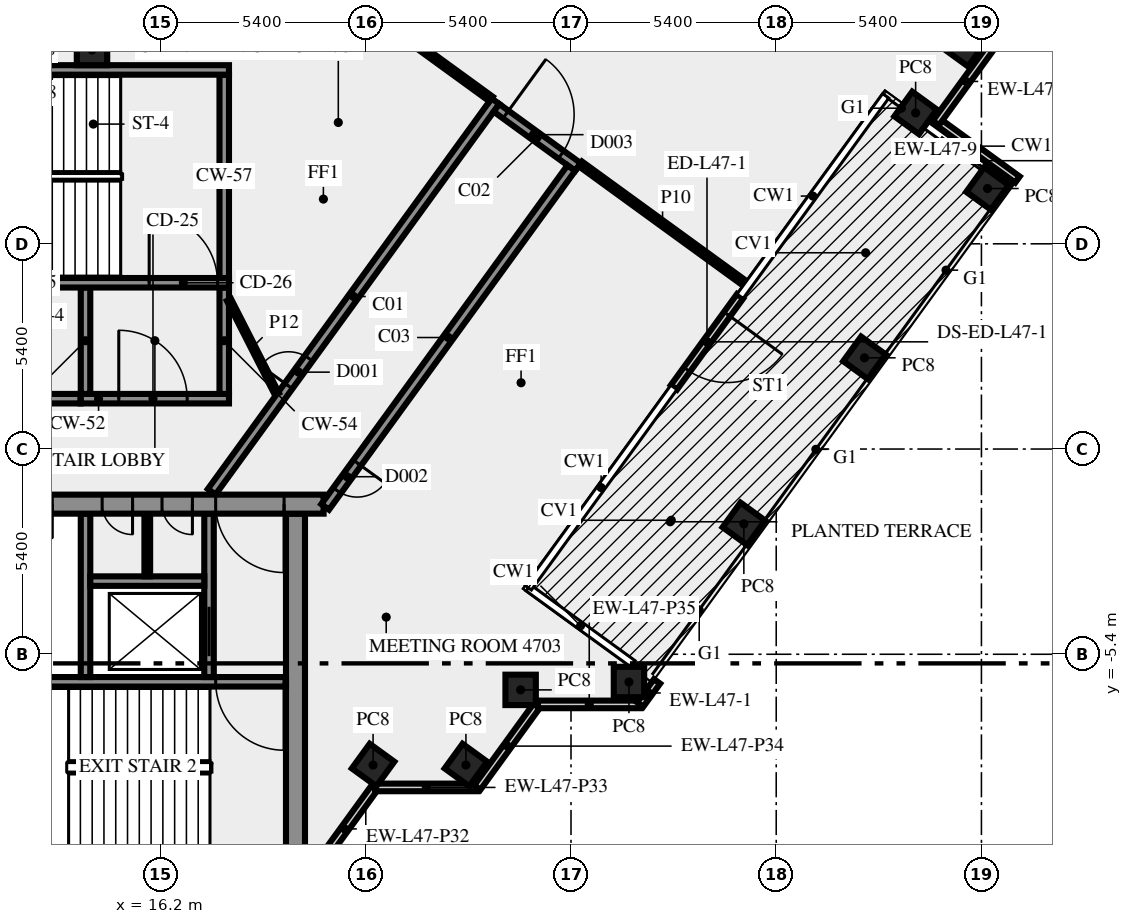
"""IFC4 building model, lengths in metres.
Left out: names, types, materials, properties, quantities, classifications, styles, units other than length and angle.
Written with IfcOpenShell. Run it as: python <this file> out.ifc"""

import sys

from ifc_helpers import new_model, si_unit, direction, frame, frame_2d, origin, origin_2d, place, context, subcontext, project, spatial, rectangle, extrude, element, fill, save


model = new_model("IFC4")
c1 = context("Model", 3, precision=1e-05, world=origin(), true_north=direction((0.0, 1.0)))
c2 = subcontext(c1, "Body", "Model", "MODEL_VIEW")
j1 = project(units=[si_unit("LENGTHUNIT", "METRE"), si_unit("PLANEANGLEUNIT", "RADIAN")], contexts=[c1])
p1 = place(None, origin())
s1 = spatial("IfcSite", under=j1, at=p1, CompositionType="ELEMENT")
p2 = place(p1, origin())
s2 = spatial("IfcBuilding", under=s1, at=p2, CompositionType="ELEMENT")
p3 = place(p2, frame((0.0, 0.0, 202.0)))
s3 = spatial("IfcBuildingStorey", under=s2, at=p3, CompositionType="ELEMENT", Elevation=202.0)
for number, where, z_axis, x_axis in (
    (1, (21.792, -8.315, 0.0), (0.0, 0.0, 1.0), (0.588, 0.809, 0.0)),
    (2, (24.235, -8.315, 0.0), (0.0, 0.0, 1.0), (0.588, 0.809, 0.0)),
    (3, (25.674, -6.337, 0.0), (0.0, 0.0, 1.0), (1.0, 0.0, 0.0)),
    (4, (28.525, -6.13, 0.0), (0.0, 0.0, 1.0), (1.0, 0.0, 0.0)),
    (5, (31.548, -1.969, 0.0), (0.0, 0.0, 1.0), (0.588, 0.809, 0.0)),
    (6, (34.722, 2.4, 0.0), (0.0, 0.0, 1.0), (0.588, 0.809, 0.0)),
    (7, (37.96, 6.855, 0.0), (0.0, 0.0, 1.0), (0.588, 0.809, 0.0)),
    (8, (36.068, 8.844, 0.0), (0.0, 0.0, 1.0), (0.588, 0.809, 0.0)),
    (9, (37.36, 10.625, 0.0), (0.0, 0.0, 1.0), (0.588, 0.809, 0.0)),
    (10, (14.395, 10.5, 0.0), (0.0, 0.0, 1.0), (-1.0, 0.0, 0.0)),
):
    element("IfcColumn", number, at=place(p3, frame(where, z_axis=z_axis, x_axis=x_axis)), inside=s3, PredefinedType="COLUMN", context=c2, shape_type="SweptSolid", body=[
        extrude(rectangle(XDim=0.8, YDim=0.8, at=origin_2d()), origin(), (0.0, 0.0, 1.0), 3.65),
    ])
p4 = place(p3, frame((20.253, -11.083, 0.0), z_axis=(0.0, 0.0, 1.0), x_axis=(0.587766567315, 0.809030569476, 0.0)))
e11 = element("IfcWall", 11, at=p4, inside=s3, PredefinedType="SOLIDWALL", context=c2, shape_type="SweptSolid", body=[
    extrude(rectangle(XDim=2.688, YDim=0.2, at=frame_2d((1.344, 0.0))), origin(), (0.0, 0.0, 1.0), 3.65),
])
p5 = place(p3, frame((21.843, -8.904, 0.0), z_axis=(0.0, 0.0, 1.0), x_axis=(1.0, 0.0, 0.0)))
e12 = element("IfcWall", 12, at=p5, inside=s3, PredefinedType="SOLIDWALL", context=c2, shape_type="SweptSolid", body=[
    extrude(rectangle(XDim=2.7, YDim=0.2, at=frame_2d((1.35, 0.0))), origin(), (0.0, 0.0, 1.0), 3.65),
])
p6 = place(p3, frame((24.533, -8.909, 0.0), z_axis=(0.0, 0.0, 1.0), x_axis=(0.587720002413, 0.809064397168, 0.0)))
e13 = element("IfcWall", 13, at=p6, inside=s3, PredefinedType="SOLIDWALL", context=c2, shape_type="SweptSolid", body=[
    extrude(rectangle(XDim=2.7, YDim=0.2, at=frame_2d((1.35, 0.0))), origin(), (0.0, 0.0, 1.0), 3.65),
])
p7 = place(p3, frame((26.13, -6.719, 0.0), z_axis=(0.0, 0.0, 1.0), x_axis=(1.0, 0.0, 0.0)))
e14 = element("IfcWall", 14, at=p7, inside=s3, PredefinedType="SOLIDWALL", context=c2, shape_type="SweptSolid", body=[
    extrude(rectangle(XDim=2.7, YDim=0.2, at=frame_2d((1.35, 0.0))), origin(), (0.0, 0.0, 1.0), 3.65),
])
p8 = place(p3, frame((28.82, -6.724, 0.0), z_axis=(0.0, 0.0, 1.0), x_axis=(0.587941177097, 0.808903685412, 0.0)))
e15 = element("IfcWall", 15, at=p8, inside=s3, PredefinedType="SOLIDWALL", context=c2, shape_type="SweptSolid", body=[
    extrude(rectangle(XDim=0.756, YDim=0.2, at=frame_2d((0.378, 0.0))), origin(), (0.0, 0.0, 1.0), 3.65),
])
p9 = place(p3, frame((31.449, 4.019, 0.0), z_axis=(0.0, 0.0, 1.0), x_axis=(-0.58782869016, -0.808985433135, 0.0)))
e16 = element("IfcWall", 16, at=p9, inside=s3, PredefinedType="SOLIDWALL", context=c2, shape_type="SweptSolid", body=[
    extrude(rectangle(XDim=2.963, YDim=0.2, at=frame_2d((1.481, 0.0))), origin(), (0.0, 0.0, 1.0), 3.65),
])
p10 = place(p9, frame((0.582, 0.0, 0.0)))
e17 = element("IfcOpeningElement", 17, at=p10, cuts=e16, PredefinedType="OPENING", context=c2, shape_type="SweptSolid", body=[
    extrude(rectangle(XDim=1.8, YDim=2.4, at=frame_2d((0.9, 1.2))), frame((0.0, 0.11, 0.0), z_axis=(0.0, -1.0, 0.0), x_axis=(1.0, 0.0, 0.0)), (0.0, 0.0, 1.0), 0.22),
])
p11 = place(p3, frame((38.748, 7.09, 0.0), z_axis=(0.0, 0.0, 1.0), x_axis=(-0.80901210161, 0.587791986546, 0.0)))
e18 = element("IfcWall", 18, at=p11, inside=s3, PredefinedType="SOLIDWALL", context=c2, shape_type="SweptSolid", body=[
    extrude(rectangle(XDim=2.6, YDim=0.2, at=frame_2d((1.3, 0.0))), origin(), (0.0, 0.0, 1.0), 3.65),
])
p12 = place(p3, frame((36.602, 8.58, 0.0), z_axis=(0.0, 0.0, 1.0), x_axis=(0.587822180636, 0.808990163075, 0.0)))
e19 = element("IfcWall", 19, at=p12, inside=s3, PredefinedType="SOLIDWALL", context=c2, shape_type="SweptSolid", body=[
    extrude(rectangle(XDim=2.7, YDim=0.2, at=frame_2d((1.35, 0.0))), origin(), (0.0, 0.0, 1.0), 3.65),
])
p13 = place(p3, frame((19.75, -10.5, 0.0), z_axis=(0.0, 0.0, 1.0), x_axis=(0.0, 1.0, 0.0)))
e20 = element("IfcWall", 20, at=p13, inside=s3, PredefinedType="SHEAR", context=c2, shape_type="SweptSolid", body=[
    extrude(rectangle(XDim=8.8, YDim=0.5, at=frame_2d((4.4, 0.0))), origin(), (0.0, 0.0, 1.0), 3.65),
])
p14 = place(p3, frame((19.5, -6.125, 0.0), z_axis=(0.0, 0.0, 1.0), x_axis=(-1.0, 0.0, 0.0)))
e21 = element("IfcWall", 21, at=p14, inside=s3, PredefinedType="SHEAR", context=c2, shape_type="SweptSolid", body=[
    extrude(rectangle(XDim=8.05, YDim=0.25, at=frame_2d((4.025, 0.0))), origin(), (0.0, 0.0, 1.0), 3.65),
])
p15 = place(p14, frame((0.05, 0.0, 0.0)))
e22 = element("IfcOpeningElement", 22, at=p15, cuts=e21, PredefinedType="OPENING", context=c2, shape_type="SweptSolid", body=[
    extrude(rectangle(XDim=1.8, YDim=2.1, at=frame_2d((0.9, 1.05))), frame((0.0, 0.135, 0.0), z_axis=(0.0, -1.0, 0.0), x_axis=(1.0, 0.0, 0.0)), (0.0, 0.0, 1.0), 0.27),
])
p16 = place(p3, frame((14.225, -6.0, 0.0), z_axis=(0.0, 0.0, 1.0), x_axis=(0.0, 1.0, 0.0)))
e23 = element("IfcWall", 23, at=p16, inside=s3, PredefinedType="SHEAR", context=c2, shape_type="SweptSolid", body=[
    extrude(rectangle(XDim=4.3, YDim=0.25, at=frame_2d((2.15, 0.0))), origin(), (0.0, 0.0, 1.0), 3.65),
])
p17 = place(p3, frame((17.475, -6.0, 0.0), z_axis=(0.0, 0.0, 1.0), x_axis=(0.0, 1.0, 0.0)))
e24 = element("IfcWall", 24, at=p17, inside=s3, PredefinedType="SHEAR", context=c2, shape_type="SweptSolid", body=[
    extrude(rectangle(XDim=4.3, YDim=0.25, at=frame_2d((2.15, 0.0))), origin(), (0.0, 0.0, 1.0), 3.65),
])
p18 = place(p17, frame((0.55, 0.0, 0.0)))
e25 = element("IfcOpeningElement", 25, at=p18, cuts=e24, PredefinedType="OPENING", context=c2, shape_type="SweptSolid", body=[
    extrude(rectangle(XDim=1.3, YDim=2.1, at=frame_2d((0.65, 1.05))), frame((0.0, 0.135, 0.0), z_axis=(0.0, -1.0, 0.0), x_axis=(1.0, 0.0, 0.0)), (0.0, 0.0, 1.0), 0.27),
])
p19 = place(p3, frame((14.35, -3.475, 0.0), z_axis=(0.0, 0.0, 1.0), x_axis=(1.0, 0.0, 0.0)))
e26 = element("IfcWall", 26, at=p19, inside=s3, PredefinedType="SHEAR", context=c2, shape_type="SweptSolid", body=[
    extrude(rectangle(XDim=3.0, YDim=0.25, at=frame_2d((1.5, 0.0))), origin(), (0.0, 0.0, 1.0), 3.65),
])
p20 = place(p3, frame((15.85, -3.35, 0.0), z_axis=(0.0, 0.0, 1.0), x_axis=(0.0, 1.0, 0.0)))
e27 = element("IfcWall", 27, at=p20, inside=s3, PredefinedType="PARTITIONING", context=c2, shape_type="SweptSolid", body=[
    extrude(rectangle(XDim=1.65, YDim=0.15, at=frame_2d((0.825, 0.0))), origin(), (0.0, 0.0, 1.0), 3.65),
])
p21 = place(p3, frame((20.49, -1.45, 0.0), z_axis=(0.0, 0.0, 1.0), x_axis=(-1.0, 0.0, 0.0)))
e28 = element("IfcWall", 28, at=p21, inside=s3, PredefinedType="SHEAR", context=c2, shape_type="SweptSolid", body=[
    extrude(rectangle(XDim=40.98, YDim=0.5, at=frame_2d((20.49, 0.0))), origin(), (0.0, 0.0, 1.0), 3.65),
])
p22 = place(p21, frame((38.14, 0.0, 0.0)))
e29 = element("IfcOpeningElement", 29, at=p22, cuts=e28, PredefinedType="OPENING", context=c2, shape_type="SweptSolid", body=[
    extrude(rectangle(XDim=1.8, YDim=2.1, at=frame_2d((0.9, 1.05))), frame((0.0, 0.26, 0.0), z_axis=(0.0, -1.0, 0.0), x_axis=(1.0, 0.0, 0.0)), (0.0, 0.0, 1.0), 0.52),
])
p23 = place(p21, frame((35.89, 0.0, 0.0)))
e30 = element("IfcOpeningElement", 30, at=p23, cuts=e28, PredefinedType="OPENING", context=c2, shape_type="SweptSolid", body=[
    extrude(rectangle(XDim=0.9, YDim=2.1, at=frame_2d((0.45, 1.05))), frame((0.0, 0.26, 0.0), z_axis=(0.0, -1.0, 0.0), x_axis=(1.0, 0.0, 0.0)), (0.0, 0.0, 1.0), 0.52),
])
p24 = place(p21, frame((32.94, 0.0, 0.0)))
e31 = element("IfcOpeningElement", 31, at=p24, cuts=e28, PredefinedType="OPENING", context=c2, shape_type="SweptSolid", body=[
    extrude(rectangle(XDim=0.9, YDim=2.1, at=frame_2d((0.45, 1.05))), frame((0.0, 0.26, 0.0), z_axis=(0.0, -1.0, 0.0), x_axis=(1.0, 0.0, 0.0)), (0.0, 0.0, 1.0), 0.52),
])
p25 = place(p21, frame((30.302, 0.0, 0.0)))
e32 = element("IfcOpeningElement", 32, at=p25, cuts=e28, PredefinedType="OPENING", context=c2, shape_type="SweptSolid", body=[
    extrude(rectangle(XDim=0.9, YDim=2.1, at=frame_2d((0.45, 1.05))), frame((0.0, 0.26, 0.0), z_axis=(0.0, -1.0, 0.0), x_axis=(1.0, 0.0, 0.0)), (0.0, 0.0, 1.0), 0.52),
])
p26 = place(p21, frame((26.577, 0.0, 0.0)))
e33 = element("IfcOpeningElement", 33, at=p26, cuts=e28, PredefinedType="OPENING", context=c2, shape_type="SweptSolid", body=[
    extrude(rectangle(XDim=0.9, YDim=2.1, at=frame_2d((0.45, 1.05))), frame((0.0, 0.26, 0.0), z_axis=(0.0, -1.0, 0.0), x_axis=(1.0, 0.0, 0.0)), (0.0, 0.0, 1.0), 0.52),
])
p27 = place(p21, frame((19.59, 0.0, 0.0)))
e34 = element("IfcOpeningElement", 34, at=p27, cuts=e28, PredefinedType="OPENING", context=c2, shape_type="SweptSolid", body=[
    extrude(rectangle(XDim=2.0, YDim=2.1, at=frame_2d((1.0, 1.05))), frame((0.0, 0.26, 0.0), z_axis=(0.0, -1.0, 0.0), x_axis=(1.0, 0.0, 0.0)), (0.0, 0.0, 1.0), 0.52),
])
p28 = place(p21, frame((7.14, 0.0, 0.0)))
e35 = element("IfcOpeningElement", 35, at=p28, cuts=e28, PredefinedType="OPENING", context=c2, shape_type="SweptSolid", body=[
    extrude(rectangle(XDim=0.9, YDim=2.1, at=frame_2d((0.45, 1.05))), frame((0.0, 0.26, 0.0), z_axis=(0.0, -1.0, 0.0), x_axis=(1.0, 0.0, 0.0)), (0.0, 0.0, 1.0), 0.52),
])
p29 = place(p21, frame((5.028, 0.0, 0.0)))
e36 = element("IfcOpeningElement", 36, at=p29, cuts=e28, PredefinedType="OPENING", context=c2, shape_type="SweptSolid", body=[
    extrude(rectangle(XDim=0.8, YDim=2.1, at=frame_2d((0.4, 1.05))), frame((0.0, 0.26, 0.0), z_axis=(0.0, -1.0, 0.0), x_axis=(1.0, 0.0, 0.0)), (0.0, 0.0, 1.0), 0.52),
])
p30 = place(p21, frame((3.452, 0.0, 0.0)))
e37 = element("IfcOpeningElement", 37, at=p30, cuts=e28, PredefinedType="OPENING", context=c2, shape_type="SweptSolid", body=[
    extrude(rectangle(XDim=0.8, YDim=2.1, at=frame_2d((0.4, 1.05))), frame((0.0, 0.26, 0.0), z_axis=(0.0, -1.0, 0.0), x_axis=(1.0, 0.0, 0.0)), (0.0, 0.0, 1.0), 0.52),
])
p31 = place(p21, frame((1.04, 0.0, 0.0)))
e38 = element("IfcOpeningElement", 38, at=p31, cuts=e28, PredefinedType="OPENING", context=c2, shape_type="SweptSolid", body=[
    extrude(rectangle(XDim=1.8, YDim=2.1, at=frame_2d((0.9, 1.05))), frame((0.0, 0.26, 0.0), z_axis=(0.0, -1.0, 0.0), x_axis=(1.0, 0.0, 0.0)), (0.0, 0.0, 1.0), 0.52),
])
p32 = place(p3, frame((14.1, 1.325, 0.0), z_axis=(0.0, 0.0, 1.0), x_axis=(1.0, 0.0, 0.0)))
e39 = element("IfcWall", 39, at=p32, inside=s3, PredefinedType="SHEAR", context=c2, shape_type="SweptSolid", body=[
    extrude(rectangle(XDim=3.9, YDim=0.25, at=frame_2d((1.95, 0.0))), origin(), (0.0, 0.0, 1.0), 3.65),
])
p33 = place(p32, frame((1.0, 0.0, 0.0)))
e40 = element("IfcOpeningElement", 40, at=p33, cuts=e39, PredefinedType="OPENING", context=c2, shape_type="SweptSolid", body=[
    extrude(rectangle(XDim=1.8, YDim=2.1, at=frame_2d((0.9, 1.05))), frame((0.0, 0.135, 0.0), z_axis=(0.0, -1.0, 0.0), x_axis=(1.0, 0.0, 0.0)), (0.0, 0.0, 1.0), 0.27),
])
for number, where, z_axis, x_axis in (
    (41, (14.225, 1.45, 0.0), (0.0, 0.0, 1.0), (0.0, 1.0, 0.0)),
    (42, (17.875, 1.45, 0.0), (0.0, 0.0, 1.0), (0.0, 1.0, 0.0)),
):
    element("IfcWall", number, at=place(p3, frame(where, z_axis=z_axis, x_axis=x_axis)), inside=s3, PredefinedType="SHEAR", context=c2, shape_type="SweptSolid", body=[
        extrude(rectangle(XDim=2.8, YDim=0.25, at=frame_2d((1.4, 0.0))), origin(), (0.0, 0.0, 1.0), 3.65),
    ])
p34 = place(p3, frame((7.5, 4.375, 0.0), z_axis=(0.0, 0.0, 1.0), x_axis=(1.0, 0.0, 0.0)))
e43 = element("IfcWall", 43, at=p34, inside=s3, PredefinedType="SHEAR", context=c2, shape_type="SweptSolid", body=[
    extrude(rectangle(XDim=10.5, YDim=0.25, at=frame_2d((5.25, 0.0))), origin(), (0.0, 0.0, 1.0), 3.65),
])
p35 = place(p34, frame((8.4, 0.0, 0.0)))
e44 = element("IfcOpeningElement", 44, at=p35, cuts=e43, PredefinedType="OPENING", context=c2, shape_type="SweptSolid", body=[
    extrude(rectangle(XDim=1.8, YDim=2.1, at=frame_2d((0.9, 1.05))), frame((0.0, 0.135, 0.0), z_axis=(0.0, -1.0, 0.0), x_axis=(1.0, 0.0, 0.0)), (0.0, 0.0, 1.0), 0.27),
])
p36 = place(p3, frame((17.875, 4.5, 0.0), z_axis=(0.0, 0.0, 1.0), x_axis=(0.0, 1.0, 0.0)))
e45 = element("IfcWall", 45, at=p36, inside=s3, PredefinedType="SHEAR", context=c2, shape_type="SweptSolid", body=[
    extrude(rectangle(XDim=5.35, YDim=0.25, at=frame_2d((2.675, 0.0))), origin(), (0.0, 0.0, 1.0), 3.65),
])
p37 = place(p3, frame((7.5, 9.975, 0.0), z_axis=(0.0, 0.0, 1.0), x_axis=(1.0, 0.0, 0.0)))
e46 = element("IfcWall", 46, at=p37, inside=s3, PredefinedType="SHEAR", context=c2, shape_type="SweptSolid", body=[
    extrude(rectangle(XDim=10.5, YDim=0.25, at=frame_2d((5.25, 0.0))), origin(), (0.0, 0.0, 1.0), 3.65),
])
p38 = place(p37, frame((2.0, 0.0, 1.0)))
e47 = element("IfcOpeningElement", 47, at=p38, cuts=e46, PredefinedType="OPENING", context=c2, shape_type="SweptSolid", body=[
    extrude(rectangle(XDim=1.2, YDim=1.2, at=frame_2d((0.6, 0.6))), frame((0.0, 0.135, 0.0), z_axis=(0.0, -1.0, 0.0), x_axis=(1.0, 0.0, 0.0)), (0.0, 0.0, 1.0), 0.27),
])
p39 = place(p3, frame((17.545, -1.125, 0.0), z_axis=(0.0, 0.0, 1.0), x_axis=(0.587796810203, 0.809008596935, 0.0)))
e48 = element("IfcWall", 48, at=p39, inside=s3, PredefinedType="SOLIDWALL", context=c2, shape_type="SweptSolid", body=[
    extrude(rectangle(XDim=12.703, YDim=0.25, at=frame_2d((6.352, 0.0))), origin(), (0.0, 0.0, 1.0), 3.65),
])
p40 = place(p39, frame((3.441, 0.0, 0.0)))
e49 = element("IfcOpeningElement", 49, at=p40, cuts=e48, PredefinedType="OPENING", context=c2, shape_type="SweptSolid", body=[
    extrude(rectangle(XDim=0.9, YDim=2.1, at=frame_2d((0.45, 1.05))), frame((0.0, 0.135, 0.0), z_axis=(0.0, -1.0, 0.0), x_axis=(1.0, 0.0, 0.0)), (0.0, 0.0, 1.0), 0.27),
])
p41 = place(p3, frame((25.039, 8.978, 0.0), z_axis=(0.0, 0.0, 1.0), x_axis=(0.809006914995, -0.587799125119, 0.0)))
e50 = element("IfcWall", 50, at=p41, inside=s3, PredefinedType="SOLIDWALL", context=c2, shape_type="SweptSolid", body=[
    extrude(rectangle(XDim=2.65, YDim=0.25, at=frame_2d((1.325, 0.0))), origin(), (0.0, 0.0, 1.0), 3.65),
])
p42 = place(p41, frame((0.301, 0.0, 0.0)))
e51 = element("IfcOpeningElement", 51, at=p42, cuts=e50, PredefinedType="OPENING", context=c2, shape_type="SweptSolid", body=[
    extrude(rectangle(XDim=1.8, YDim=2.1, at=frame_2d((0.9, 1.05))), frame((0.0, 0.135, 0.0), z_axis=(0.0, -1.0, 0.0), x_axis=(1.0, 0.0, 0.0)), (0.0, 0.0, 1.0), 0.27),
])
p43 = place(p3, frame((27.009, 7.392, 0.0), z_axis=(0.0, 0.0, 1.0), x_axis=(-0.587776457057, -0.809023384414, 0.0)))
e52 = element("IfcWall", 52, at=p43, inside=s3, PredefinedType="SOLIDWALL", context=c2, shape_type="SweptSolid", body=[
    extrude(rectangle(XDim=11.021, YDim=0.25, at=frame_2d((5.51, 0.0))), origin(), (0.0, 0.0, 1.0), 3.65),
])
p44 = place(p43, frame((9.588, 0.0, 0.0)))
e53 = element("IfcOpeningElement", 53, at=p44, cuts=e52, PredefinedType="OPENING", context=c2, shape_type="SweptSolid", body=[
    extrude(rectangle(XDim=0.9, YDim=2.1, at=frame_2d((0.45, 1.05))), frame((0.0, 0.135, 0.0), z_axis=(0.0, -1.0, 0.0), x_axis=(1.0, 0.0, 0.0)), (0.0, 0.0, 1.0), 0.27),
])
p45 = place(p3, frame((6.754, 1.325, 0.0), z_axis=(0.0, 0.0, 1.0), x_axis=(1.0, 0.0, 0.0)))
e54 = element("IfcWall", 54, at=p45, inside=s3, PredefinedType="SOLIDWALL", context=c2, shape_type="SweptSolid", body=[
    extrude(rectangle(XDim=7.336, YDim=0.25, at=frame_2d((3.668, 0.0))), origin(), (0.0, 0.0, 1.0), 3.65),
])
p46 = place(p3, frame((24.898, 9.21, 0.0), z_axis=(0.0, 0.0, 1.0), x_axis=(-0.809034479891, 0.587761184791, 0.0)))
e55 = element("IfcWall", 55, at=p46, inside=s3, PredefinedType="PARTITIONING", context=c2, shape_type="SweptSolid", body=[
    extrude(rectangle(XDim=9.55, YDim=0.15, at=frame_2d((4.775, 0.0))), origin(), (0.0, 0.0, 1.0), 2.85),
])
p47 = place(p3, frame((31.573, 4.36, 0.0), z_axis=(0.0, 0.0, 1.0), x_axis=(-0.809041862067, 0.587751023328, 0.0)))
e56 = element("IfcWall", 56, at=p47, inside=s3, PredefinedType="PARTITIONING", context=c2, shape_type="SweptSolid", body=[
    extrude(rectangle(XDim=5.35, YDim=0.15, at=frame_2d((2.675, 0.0))), origin(), (0.0, 0.0, 1.0), 3.65),
])
p48 = place(p3, frame((18.0, 3.925, 0.0), z_axis=(0.0, 0.0, 1.0), x_axis=(0.453950796792, -0.891026752736, 0.0)))
e57 = element("IfcWall", 57, at=p48, inside=s3, PredefinedType="PARTITIONING", context=c2, shape_type="SweptSolid", body=[
    extrude(rectangle(XDim=2.778, YDim=0.12, at=frame_2d((1.389, 0.0))), origin(), (0.0, 0.0, 1.0), 3.65),
])
p49 = place(p10, origin())
e58 = element("IfcDoor", 58, at=p49, inside=s3, OperationType="DOUBLE_DOOR_SINGLE_SWING", PredefinedType="DOOR", context=c2, shape_type="SweptSolid", body=[
    extrude(rectangle(XDim=1.8, YDim=2.4, at=frame_2d((0.9, 1.2))), frame((0.0, 0.025, 0.0), z_axis=(0.0, -1.0, 0.0), x_axis=(1.0, 0.0, 0.0)), (0.0, 0.0, 1.0), 0.05),
])
fill(e17, e58)
p50 = place(p15, origin())
e59 = element("IfcDoor", 59, at=p50, inside=s3, OperationType="DOUBLE_DOOR_SINGLE_SWING", PredefinedType="DOOR", context=c2, shape_type="SweptSolid", body=[
    extrude(rectangle(XDim=1.8, YDim=2.1, at=frame_2d((0.9, 1.05))), frame((0.0, 0.025, 0.0), z_axis=(0.0, -1.0, 0.0), x_axis=(1.0, 0.0, 0.0)), (0.0, 0.0, 1.0), 0.05),
])
fill(e22, e59)
p51 = place(p18, origin())
e60 = element("IfcDoor", 60, at=p51, inside=s3, OperationType="DOUBLE_DOOR_SLIDING", PredefinedType="DOOR", context=c2, shape_type="SweptSolid", body=[
    extrude(rectangle(XDim=1.3, YDim=2.1, at=frame_2d((0.65, 1.05))), frame((0.0, 0.025, 0.0), z_axis=(0.0, -1.0, 0.0), x_axis=(1.0, 0.0, 0.0)), (0.0, 0.0, 1.0), 0.05),
])
fill(e25, e60)
p52 = place(p29, origin())
e61 = element("IfcDoor", 61, at=p52, inside=s3, OperationType="SINGLE_SWING_LEFT", PredefinedType="DOOR", context=c2, shape_type="SweptSolid", body=[
    extrude(rectangle(XDim=0.8, YDim=2.1, at=frame_2d((0.4, 1.05))), frame((0.0, 0.025, 0.0), z_axis=(0.0, -1.0, 0.0), x_axis=(1.0, 0.0, 0.0)), (0.0, 0.0, 1.0), 0.05),
])
fill(e36, e61)
p53 = place(p30, origin())
e62 = element("IfcDoor", 62, at=p53, inside=s3, OperationType="SINGLE_SWING_LEFT", PredefinedType="DOOR", context=c2, shape_type="SweptSolid", body=[
    extrude(rectangle(XDim=0.8, YDim=2.1, at=frame_2d((0.4, 1.05))), frame((0.0, 0.025, 0.0), z_axis=(0.0, -1.0, 0.0), x_axis=(1.0, 0.0, 0.0)), (0.0, 0.0, 1.0), 0.05),
])
fill(e37, e62)
p54 = place(p31, origin())
e63 = element("IfcDoor", 63, at=p54, inside=s3, OperationType="DOUBLE_DOOR_SINGLE_SWING", PredefinedType="DOOR", context=c2, shape_type="SweptSolid", body=[
    extrude(rectangle(XDim=1.8, YDim=2.1, at=frame_2d((0.9, 1.05))), frame((0.0, 0.025, 0.0), z_axis=(0.0, -1.0, 0.0), x_axis=(1.0, 0.0, 0.0)), (0.0, 0.0, 1.0), 0.05),
])
fill(e38, e63)
p55 = place(p33, origin())
e64 = element("IfcDoor", 64, at=p55, inside=s3, OperationType="DOUBLE_DOOR_SINGLE_SWING", PredefinedType="DOOR", context=c2, shape_type="SweptSolid", body=[
    extrude(rectangle(XDim=1.8, YDim=2.1, at=frame_2d((0.9, 1.05))), frame((0.0, 0.025, 0.0), z_axis=(0.0, -1.0, 0.0), x_axis=(1.0, 0.0, 0.0)), (0.0, 0.0, 1.0), 0.05),
])
fill(e40, e64)
p56 = place(p35, origin())
e65 = element("IfcDoor", 65, at=p56, inside=s3, OperationType="DOUBLE_DOOR_SINGLE_SWING", PredefinedType="DOOR", context=c2, shape_type="SweptSolid", body=[
    extrude(rectangle(XDim=1.8, YDim=2.1, at=frame_2d((0.9, 1.05))), frame((0.0, 0.025, 0.0), z_axis=(0.0, -1.0, 0.0), x_axis=(1.0, 0.0, 0.0)), (0.0, 0.0, 1.0), 0.05),
])
fill(e44, e65)
p57 = place(p40, origin())
e66 = element("IfcDoor", 66, at=p57, inside=s3, OperationType="SINGLE_SWING_LEFT", PredefinedType="DOOR", context=c2, shape_type="SweptSolid", body=[
    extrude(rectangle(XDim=0.9, YDim=2.1, at=frame_2d((0.45, 1.05))), frame((0.0, 0.025, 0.0), z_axis=(0.0, -1.0, 0.0), x_axis=(1.0, 0.0, 0.0)), (0.0, 0.0, 1.0), 0.05),
])
fill(e49, e66)
p58 = place(p44, origin())
e67 = element("IfcDoor", 67, at=p58, inside=s3, OperationType="SINGLE_SWING_RIGHT", PredefinedType="DOOR", context=c2, shape_type="SweptSolid", body=[
    extrude(rectangle(XDim=0.9, YDim=2.1, at=frame_2d((0.45, 1.05))), frame((0.0, 0.025, 0.0), z_axis=(0.0, -1.0, 0.0), x_axis=(1.0, 0.0, 0.0)), (0.0, 0.0, 1.0), 0.05),
])
fill(e53, e67)
p59 = place(p42, origin())
e68 = element("IfcDoor", 68, at=p59, inside=s3, OperationType="DOUBLE_DOOR_SINGLE_SWING", PredefinedType="DOOR", context=c2, shape_type="SweptSolid", body=[
    extrude(rectangle(XDim=1.8, YDim=2.1, at=frame_2d((0.9, 1.05))), frame((0.0, 0.025, 0.0), z_axis=(0.0, -1.0, 0.0), x_axis=(1.0, 0.0, 0.0)), (0.0, 0.0, 1.0), 0.05),
])
fill(e51, e68)
save(model, sys.argv[1])
